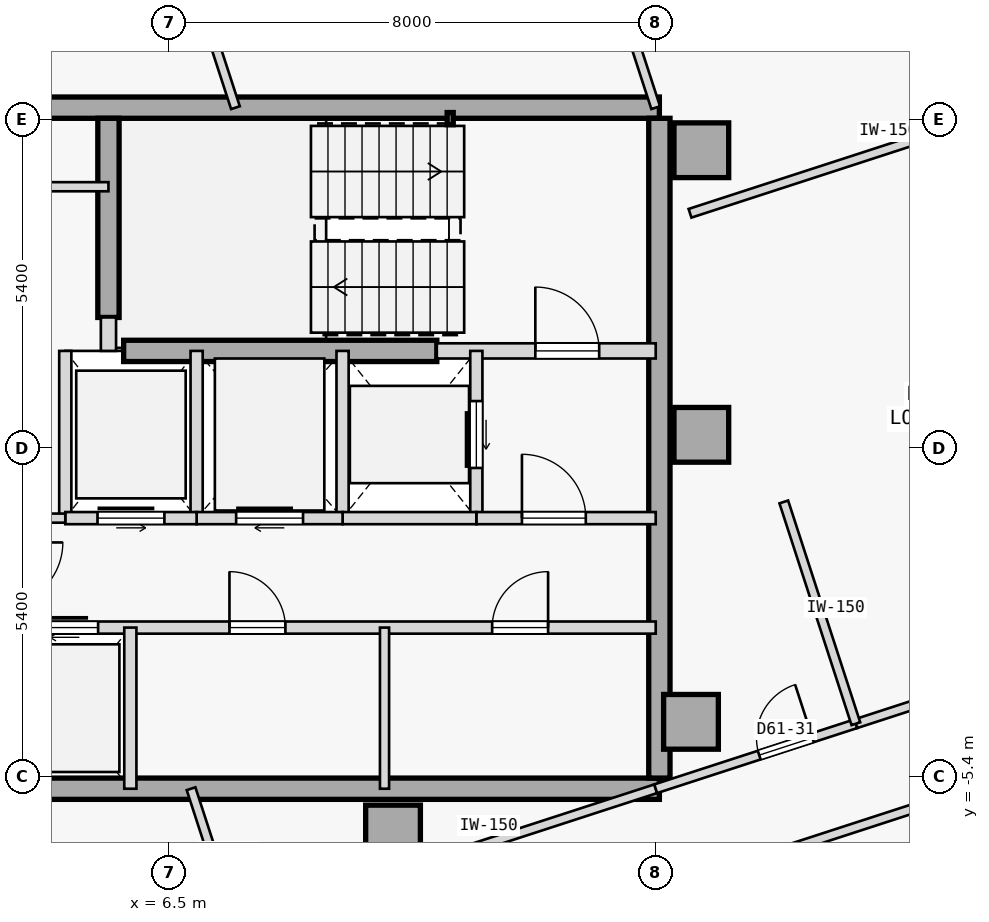
"""IFC4 building model, lengths in metres.
Left out: names, types, materials, properties, quantities, classifications, styles, units other than length and angle.
Written with IfcOpenShell. Run it as: python <this file> out.ifc"""

import sys

from ifc_helpers import new_model, si_unit, direction, frame, frame_2d, origin, origin_2d, place, context, subcontext, project, spatial, rectangle, hollow_rectangle, extrude, element, fill, save


model = new_model("IFC4")
c1 = context("Model", 3, precision=1e-05, world=origin(), true_north=direction((0.0, 1.0)))
c2 = subcontext(c1, "Body", "Model", "MODEL_VIEW")
j1 = project(units=[si_unit("LENGTHUNIT", "METRE"), si_unit("PLANEANGLEUNIT", "RADIAN")], contexts=[c1])
p1 = place(None, origin())
s1 = spatial("IfcSite", under=j1, at=p1, CompositionType="ELEMENT")
p2 = place(p1, origin())
s2 = spatial("IfcBuilding", under=s1, at=p2, CompositionType="ELEMENT")
p3 = place(p2, frame((0.0, 0.0, 231.0)))
s3 = spatial("IfcBuildingStorey", under=s2, at=p3, CompositionType="ELEMENT", Elevation=231.0)
for number, where, z_axis, x_axis in (
    (1, (15.25, 4.9, 0.0), (0.0, 0.0, 1.0), (1.0, 0.0, 0.0)),
    (2, (15.25, 0.22, 0.0), (0.0, 0.0, 1.0), (1.0, 0.0, 0.0)),
    (3, (15.08, -4.5, 0.0), (0.0, 0.0, 1.0), (1.0, 0.0, 0.0)),
    (4, (10.18, -6.32, 0.0), (0.0, 0.0, 1.0), (1.0, 0.0, 0.0)),
):
    element("IfcColumn", number, at=place(p3, frame(where, z_axis=z_axis, x_axis=x_axis)), inside=s3, PredefinedType="COLUMN", context=c2, shape_type="SweptSolid", body=[
        extrude(rectangle(XDim=0.9, YDim=0.9, at=origin_2d()), origin(), (0.0, 0.0, 1.0), 3.35),
    ])
p4 = place(p3, frame((3.15, 5.6, 0.0), z_axis=(0.0, 0.0, 1.0), x_axis=(1.0, 0.0, 0.0)))
e5 = element("IfcWall", 5, at=p4, inside=s3, PredefinedType="SHEAR", context=c2, shape_type="SweptSolid", body=[
    extrude(rectangle(XDim=11.41, YDim=0.35, at=frame_2d((5.705, 0.0))), origin(), (0.0, 0.0, 1.0), 3.125),
])
p5 = place(p3, frame((3.7, -5.6, 0.0), z_axis=(0.0, 0.0, 1.0), x_axis=(1.0, 0.0, 0.0)))
e6 = element("IfcWall", 6, at=p5, inside=s3, PredefinedType="SHEAR", context=c2, shape_type="SweptSolid", body=[
    extrude(rectangle(XDim=10.86, YDim=0.35, at=frame_2d((5.43, 0.0))), origin(), (0.0, 0.0, 1.0), 3.125),
])
p6 = place(p3, frame((14.56, -5.425, 0.0), z_axis=(0.0, 0.0, 1.0), x_axis=(0.0, 1.0, 0.0)))
e7 = element("IfcWall", 7, at=p6, inside=s3, PredefinedType="SHEAR", context=c2, shape_type="SweptSolid", body=[
    extrude(rectangle(XDim=10.85, YDim=0.35, at=frame_2d((5.425, 0.0))), origin(), (0.0, 0.0, 1.0), 3.125),
])
p7 = place(p3, frame((5.5, 2.15, 0.0), z_axis=(0.0, 0.0, 1.0), x_axis=(0.0, 1.0, 0.0)))
e8 = element("IfcWall", 8, at=p7, inside=s3, PredefinedType="SHEAR", context=c2, shape_type="SweptSolid", body=[
    extrude(rectangle(XDim=3.275, YDim=0.35, at=frame_2d((1.638, 0.0))), origin(), (0.0, 0.0, 1.0), 3.125),
])
p8 = place(p3, frame((5.75, 1.6, 0.0), z_axis=(0.0, 0.0, 1.0), x_axis=(1.0, 0.0, 0.0)))
e9 = element("IfcWall", 9, at=p8, inside=s3, PredefinedType="SHEAR", context=c2, shape_type="SweptSolid", body=[
    extrude(rectangle(XDim=5.15, YDim=0.35, at=frame_2d((2.575, 0.0))), origin(), (0.0, 0.0, 1.0), 3.125),
])
p9 = place(p3, frame((11.12, 5.42, 0.0), z_axis=(0.0, 0.0, 1.0), x_axis=(1.0, 0.0, 0.0)))
e10 = element("IfcColumn", 10, at=p9, inside=s3, PredefinedType="COLUMN", context=c2, shape_type="SweptSolid", body=[
    extrude(hollow_rectangle(XDim=0.1, YDim=0.2, WallThickness=0.008, at=origin_2d()), origin(), (0.0, 0.0, 1.0), 3.35),
])
p10 = place(p3, frame((10.9, 1.6, 0.0), z_axis=(0.0, 0.0, 1.0), x_axis=(1.0, 0.0, 0.0)))
e11 = element("IfcWall", 11, at=p10, inside=s3, PredefinedType="STANDARD", context=c2, shape_type="SweptSolid", body=[
    extrude(rectangle(XDim=3.6, YDim=0.25, at=frame_2d((1.8, 0.0))), origin(), (0.0, 0.0, 1.0), 3.125),
])
p11 = place(p10, frame((1.62, 0.0, 0.0)))
e12 = element("IfcOpeningElement", 12, at=p11, cuts=e11, PredefinedType="OPENING", context=c2, shape_type="SweptSolid", body=[
    extrude(rectangle(XDim=1.05, YDim=2.15, at=frame_2d((0.525, 1.075))), frame((0.0, 0.135, 0.0), z_axis=(0.0, -1.0, 0.0), x_axis=(1.0, 0.0, 0.0)), (0.0, 0.0, 1.0), 0.27),
])
p12 = place(p3, frame((5.5, 1.6, 0.0), z_axis=(0.0, 0.0, 1.0), x_axis=(0.0, 1.0, 0.0)))
e13 = element("IfcWall", 13, at=p12, inside=s3, PredefinedType="STANDARD", context=c2, shape_type="SweptSolid", body=[
    extrude(rectangle(XDim=0.55, YDim=0.25, at=frame_2d((0.275, 0.0))), origin(), (0.0, 0.0, 1.0), 3.125),
])
p13 = place(p3, frame((11.55, -1.15, 0.0), z_axis=(0.0, 0.0, 1.0), x_axis=(0.0, 1.0, 0.0)))
e14 = element("IfcWall", 14, at=p13, inside=s3, PredefinedType="STANDARD", context=c2, shape_type="SweptSolid", body=[
    extrude(rectangle(XDim=2.75, YDim=0.2, at=frame_2d((1.375, 0.0))), origin(), (0.0, 0.0, 1.0), 3.125),
])
p14 = place(p13, frame((0.825, 0.0, 0.0)))
e15 = element("IfcOpeningElement", 15, at=p14, cuts=e14, PredefinedType="OPENING", context=c2, shape_type="SweptSolid", body=[
    extrude(rectangle(XDim=1.1, YDim=2.15, at=frame_2d((0.55, 1.075))), frame((0.0, 0.11, 0.0), z_axis=(0.0, -1.0, 0.0), x_axis=(1.0, 0.0, 0.0)), (0.0, 0.0, 1.0), 0.22),
])
p15 = place(p3, frame((9.35, -1.15, 0.0), z_axis=(0.0, 0.0, 1.0), x_axis=(0.0, 1.0, 0.0)))
e16 = element("IfcWall", 16, at=p15, inside=s3, PredefinedType="STANDARD", context=c2, shape_type="SweptSolid", body=[
    extrude(rectangle(XDim=2.75, YDim=0.2, at=frame_2d((1.375, 0.0))), origin(), (0.0, 0.0, 1.0), 3.125),
])
p16 = place(p3, frame((11.55, -1.15, 0.0), z_axis=(0.0, 0.0, 1.0), x_axis=(1.0, 0.0, 0.0)))
e17 = element("IfcWall", 17, at=p16, inside=s3, PredefinedType="STANDARD", context=c2, shape_type="SweptSolid", body=[
    extrude(rectangle(XDim=2.95, YDim=0.2, at=frame_2d((1.475, 0.0))), origin(), (0.0, 0.0, 1.0), 3.125),
])
p17 = place(p16, frame((0.75, 0.0, 0.0)))
e18 = element("IfcOpeningElement", 18, at=p17, cuts=e17, PredefinedType="OPENING", context=c2, shape_type="SweptSolid", body=[
    extrude(rectangle(XDim=1.05, YDim=2.18, at=frame_2d((0.525, 1.09))), frame((0.0, 0.11, 0.0), z_axis=(0.0, -1.0, 0.0), x_axis=(1.0, 0.0, 0.0)), (0.0, 0.0, 1.0), 0.22),
])
p18 = place(p3, frame((9.35, -1.15, 0.0), z_axis=(0.0, 0.0, 1.0), x_axis=(1.0, 0.0, 0.0)))
e19 = element("IfcWall", 19, at=p18, inside=s3, PredefinedType="STANDARD", context=c2, shape_type="SweptSolid", body=[
    extrude(rectangle(XDim=2.2, YDim=0.2, at=frame_2d((1.1, 0.0))), origin(), (0.0, 0.0, 1.0), 3.125),
])
p19 = place(p3, frame((6.95, -1.15, 0.0), z_axis=(0.0, 0.0, 1.0), x_axis=(0.0, 1.0, 0.0)))
e20 = element("IfcWall", 20, at=p19, inside=s3, PredefinedType="STANDARD", context=c2, shape_type="SweptSolid", body=[
    extrude(rectangle(XDim=2.75, YDim=0.2, at=frame_2d((1.375, 0.0))), origin(), (0.0, 0.0, 1.0), 3.125),
])
p20 = place(p3, frame((6.95, -1.15, 0.0), z_axis=(0.0, 0.0, 1.0), x_axis=(1.0, 0.0, 0.0)))
e21 = element("IfcWall", 21, at=p20, inside=s3, PredefinedType="STANDARD", context=c2, shape_type="SweptSolid", body=[
    extrude(rectangle(XDim=2.4, YDim=0.2, at=frame_2d((1.2, 0.0))), origin(), (0.0, 0.0, 1.0), 3.125),
])
p21 = place(p20, frame((0.65, 0.0, 0.0)))
e22 = element("IfcOpeningElement", 22, at=p21, cuts=e21, PredefinedType="OPENING", context=c2, shape_type="SweptSolid", body=[
    extrude(rectangle(XDim=1.1, YDim=2.15, at=frame_2d((0.55, 1.075))), frame((0.0, 0.11, 0.0), z_axis=(0.0, -1.0, 0.0), x_axis=(1.0, 0.0, 0.0)), (0.0, 0.0, 1.0), 0.22),
])
p22 = place(p3, frame((4.79, -1.15, 0.0), z_axis=(0.0, 0.0, 1.0), x_axis=(0.0, 1.0, 0.0)))
e23 = element("IfcWall", 23, at=p22, inside=s3, PredefinedType="STANDARD", context=c2, shape_type="SweptSolid", body=[
    extrude(rectangle(XDim=2.75, YDim=0.2, at=frame_2d((1.375, 0.0))), origin(), (0.0, 0.0, 1.0), 3.125),
])
p23 = place(p3, frame((4.79, -1.15, 0.0), z_axis=(0.0, 0.0, 1.0), x_axis=(1.0, 0.0, 0.0)))
e24 = element("IfcWall", 24, at=p23, inside=s3, PredefinedType="STANDARD", context=c2, shape_type="SweptSolid", body=[
    extrude(rectangle(XDim=2.16, YDim=0.2, at=frame_2d((1.08, 0.0))), origin(), (0.0, 0.0, 1.0), 3.125),
])
p24 = place(p23, frame((0.53, 0.0, 0.0)))
e25 = element("IfcOpeningElement", 25, at=p24, cuts=e24, PredefinedType="OPENING", context=c2, shape_type="SweptSolid", body=[
    extrude(rectangle(XDim=1.1, YDim=2.15, at=frame_2d((0.55, 1.075))), frame((0.0, 0.11, 0.0), z_axis=(0.0, -1.0, 0.0), x_axis=(1.0, 0.0, 0.0)), (0.0, 0.0, 1.0), 0.22),
])
p25 = place(p3, frame((3.7, -1.15, 0.0), z_axis=(0.0, 0.0, 1.0), x_axis=(1.0, 0.0, 0.0)))
e26 = element("IfcWall", 26, at=p25, inside=s3, PredefinedType="PARTITIONING", context=c2, shape_type="SweptSolid", body=[
    extrude(rectangle(XDim=1.09, YDim=0.15, at=frame_2d((0.545, 0.0))), origin(), (0.0, 0.0, 1.0), 3.125),
])
p26 = place(p3, frame((3.7, -2.95, 0.0), z_axis=(0.0, 0.0, 1.0), x_axis=(1.0, 0.0, 0.0)))
e27 = element("IfcWall", 27, at=p26, inside=s3, PredefinedType="STANDARD", context=c2, shape_type="SweptSolid", body=[
    extrude(rectangle(XDim=10.8, YDim=0.2, at=frame_2d((5.4, 0.0))), origin(), (0.0, 0.0, 1.0), 3.125),
])
p27 = place(p26, frame((0.53, 0.0, 0.0)))
e28 = element("IfcOpeningElement", 28, at=p27, cuts=e27, PredefinedType="OPENING", context=c2, shape_type="SweptSolid", body=[
    extrude(rectangle(XDim=1.1, YDim=2.15, at=frame_2d((0.55, 1.075))), frame((0.0, 0.11, 0.0), z_axis=(0.0, -1.0, 0.0), x_axis=(1.0, 0.0, 0.0)), (0.0, 0.0, 1.0), 0.22),
])
p28 = place(p26, frame((3.79, 0.0, 0.0)))
e29 = element("IfcOpeningElement", 29, at=p28, cuts=e27, PredefinedType="OPENING", context=c2, shape_type="SweptSolid", body=[
    extrude(rectangle(XDim=0.92, YDim=2.15, at=frame_2d((0.46, 1.075))), frame((0.0, 0.11, 0.0), z_axis=(0.0, -1.0, 0.0), x_axis=(1.0, 0.0, 0.0)), (0.0, 0.0, 1.0), 0.22),
])
p29 = place(p26, frame((8.11, 0.0, 0.0)))
e30 = element("IfcOpeningElement", 30, at=p29, cuts=e27, PredefinedType="OPENING", context=c2, shape_type="SweptSolid", body=[
    extrude(rectangle(XDim=0.92, YDim=2.15, at=frame_2d((0.46, 1.075))), frame((0.0, 0.11, 0.0), z_axis=(0.0, -1.0, 0.0), x_axis=(1.0, 0.0, 0.0)), (0.0, 0.0, 1.0), 0.22),
])
p30 = place(p3, frame((5.86, -5.6, 0.0), z_axis=(0.0, 0.0, 1.0), x_axis=(0.0, 1.0, 0.0)))
e31 = element("IfcWall", 31, at=p30, inside=s3, PredefinedType="STANDARD", context=c2, shape_type="SweptSolid", body=[
    extrude(rectangle(XDim=2.65, YDim=0.2, at=frame_2d((1.325, 0.0))), origin(), (0.0, 0.0, 1.0), 3.125),
])
p31 = place(p3, frame((10.04, -5.6, 0.0), z_axis=(0.0, 0.0, 1.0), x_axis=(0.0, 1.0, 0.0)))
e32 = element("IfcWall", 32, at=p31, inside=s3, PredefinedType="PARTITIONING", context=c2, shape_type="SweptSolid", body=[
    extrude(rectangle(XDim=2.65, YDim=0.15, at=frame_2d((1.325, 0.0))), origin(), (0.0, 0.0, 1.0), 3.125),
])
p32 = place(p3, frame((3.7, 4.3, 0.0), z_axis=(0.0, 0.0, 1.0), x_axis=(1.0, 0.0, 0.0)))
e33 = element("IfcWall", 33, at=p32, inside=s3, PredefinedType="PARTITIONING", context=c2, shape_type="SweptSolid", body=[
    extrude(rectangle(XDim=1.8, YDim=0.15, at=frame_2d((0.9, 0.0))), origin(), (0.0, 0.0, 1.0), 3.125),
])
p33 = place(p3, frame((11.669, -8.223, 0.0), z_axis=(0.0, 0.0, 1.0), x_axis=(0.951057967787, 0.309012527106, 0.0)))
e34 = element("IfcWall", 34, at=p33, inside=s3, PredefinedType="PARTITIONING", context=c2, shape_type="SweptSolid", body=[
    extrude(rectangle(XDim=19.291, YDim=0.15, at=frame_2d((9.646, 0.0))), origin(), (0.0, 0.0, 1.0), 3.125),
])
p34 = place(p33, frame((9.17, 0.0, 0.0)))
e35 = element("IfcOpeningElement", 35, at=p34, cuts=e34, PredefinedType="OPENING", context=c2, shape_type="SweptSolid", body=[
    extrude(rectangle(XDim=0.95, YDim=2.15, at=frame_2d((0.475, 1.075))), frame((0.0, 0.085, 0.0), z_axis=(0.0, -1.0, 0.0), x_axis=(1.0, 0.0, 0.0)), (0.0, 0.0, 1.0), 0.17),
])
p35 = place(p3, frame((7.588, -7.846, 0.0), z_axis=(0.0, 0.0, 1.0), x_axis=(0.951058013903, 0.309012385174, 0.0)))
e36 = element("IfcWall", 36, at=p35, inside=s3, PredefinedType="PARTITIONING", context=c2, shape_type="SweptSolid", body=[
    extrude(rectangle(XDim=7.267, YDim=0.15, at=frame_2d((3.634, 0.0))), origin(), (0.0, 0.0, 1.0), 3.125),
])
p36 = place(p35, frame((0.557, 0.0, 0.0)))
e37 = element("IfcOpeningElement", 37, at=p36, cuts=e36, PredefinedType="OPENING", context=c2, shape_type="SweptSolid", body=[
    extrude(rectangle(XDim=0.92, YDim=2.15, at=frame_2d((0.46, 1.075))), frame((0.0, 0.085, 0.0), z_axis=(0.0, -1.0, 0.0), x_axis=(1.0, 0.0, 0.0)), (0.0, 0.0, 1.0), 0.17),
])
p37 = place(p3, frame((14.5, -5.6, 0.0), z_axis=(0.0, 0.0, 1.0), x_axis=(0.951047546178, 0.309044600193, 0.0)))
e38 = element("IfcWall", 38, at=p37, inside=s3, PredefinedType="PARTITIONING", context=c2, shape_type="SweptSolid", body=[
    extrude(rectangle(XDim=3.461, YDim=0.15, at=frame_2d((1.73, 0.0))), origin(), (0.0, 0.0, 1.0), 3.125),
])
p38 = place(p37, frame((1.79, 0.0, 0.0)))
e39 = element("IfcOpeningElement", 39, at=p38, cuts=e38, PredefinedType="OPENING", context=c2, shape_type="SweptSolid", body=[
    extrude(rectangle(XDim=0.92, YDim=2.15, at=frame_2d((0.46, 1.075))), frame((0.0, 0.085, 0.0), z_axis=(0.0, -1.0, 0.0), x_axis=(1.0, 0.0, 0.0)), (0.0, 0.0, 1.0), 0.17),
])
p39 = place(p3, frame((17.791, -4.531, 0.0), z_axis=(0.0, 0.0, 1.0), x_axis=(0.951056769902, 0.309016213852, 0.0)))
e40 = element("IfcWall", 40, at=p39, inside=s3, PredefinedType="PARTITIONING", context=c2, shape_type="SweptSolid", body=[
    extrude(rectangle(XDim=10.352, YDim=0.15, at=frame_2d((5.176, 0.0))), origin(), (0.0, 0.0, 1.0), 3.125),
])
p40 = place(p39, frame((4.716, 0.0, 0.0)))
e41 = element("IfcOpeningElement", 41, at=p40, cuts=e40, PredefinedType="OPENING", context=c2, shape_type="SweptSolid", body=[
    extrude(rectangle(XDim=0.92, YDim=2.15, at=frame_2d((0.46, 1.075))), frame((0.0, 0.085, 0.0), z_axis=(0.0, -1.0, 0.0), x_axis=(1.0, 0.0, 0.0)), (0.0, 0.0, 1.0), 0.17),
])
p41 = place(p3, frame((7.588, -7.846, 0.0), z_axis=(0.0, 0.0, 1.0), x_axis=(-0.309055688452, 0.951043942957, 0.0)))
e42 = element("IfcWall", 42, at=p41, inside=s3, PredefinedType="PARTITIONING", context=c2, shape_type="SweptSolid", body=[
    extrude(rectangle(XDim=2.362, YDim=0.15, at=frame_2d((1.181, 0.0))), origin(), (0.0, 0.0, 1.0), 3.125),
])
p42 = place(p3, frame((17.791, -4.531, 0.0), z_axis=(0.0, 0.0, 1.0), x_axis=(-0.309018414265, 0.951056054944, 0.0)))
e43 = element("IfcWall", 43, at=p42, inside=s3, PredefinedType="PARTITIONING", context=c2, shape_type="SweptSolid", body=[
    extrude(rectangle(XDim=3.835, YDim=0.15, at=frame_2d((1.917, 0.0))), origin(), (0.0, 0.0, 1.0), 3.125),
])
p43 = place(p3, frame((7.588, 5.6, 0.0), z_axis=(0.0, 0.0, 1.0), x_axis=(-0.309018946982, 0.951055881852, 0.0)))
e44 = element("IfcWall", 44, at=p43, inside=s3, PredefinedType="PARTITIONING", context=c2, shape_type="SweptSolid", body=[
    extrude(rectangle(XDim=6.826, YDim=0.15, at=frame_2d((3.413, 0.0))), origin(), (0.0, 0.0, 1.0), 3.125),
])
p44 = place(p3, frame((14.5, 5.6, 0.0), z_axis=(0.0, 0.0, 1.0), x_axis=(-0.308974360462, 0.951070367837, 0.0)))
e45 = element("IfcWall", 45, at=p44, inside=s3, PredefinedType="PARTITIONING", context=c2, shape_type="SweptSolid", body=[
    extrude(rectangle(XDim=4.843, YDim=0.15, at=frame_2d((2.421, 0.0))), origin(), (0.0, 0.0, 1.0), 3.125),
])
p45 = place(p3, frame((15.064, 3.863, 0.0), z_axis=(0.0, 0.0, 1.0), x_axis=(0.951061448945, 0.309001812827, 0.0)))
e46 = element("IfcWall", 46, at=p45, inside=s3, PredefinedType="PARTITIONING", context=c2, shape_type="SweptSolid", body=[
    extrude(rectangle(XDim=10.352, YDim=0.15, at=frame_2d((5.176, 0.0))), origin(), (0.0, 0.0, 1.0), 3.125),
])
p46 = place(p45, frame((4.716, 0.0, 0.0)))
e47 = element("IfcOpeningElement", 47, at=p46, cuts=e46, PredefinedType="OPENING", context=c2, shape_type="SweptSolid", body=[
    extrude(rectangle(XDim=0.92, YDim=2.15, at=frame_2d((0.46, 1.075))), frame((0.0, 0.085, 0.0), z_axis=(0.0, -1.0, 0.0), x_axis=(1.0, 0.0, 0.0)), (0.0, 0.0, 1.0), 0.17),
])
p47 = place(p11, origin())
e48 = element("IfcDoor", 48, at=p47, inside=s3, OperationType="SINGLE_SWING_LEFT", PredefinedType="DOOR", context=c2, shape_type="SweptSolid", body=[
    extrude(rectangle(XDim=1.05, YDim=2.15, at=frame_2d((0.525, 1.075))), frame((0.0, 0.025, 0.0), z_axis=(0.0, -1.0, 0.0), x_axis=(1.0, 0.0, 0.0)), (0.0, 0.0, 1.0), 0.05),
])
fill(e12, e48)
p48 = place(p17, origin())
e49 = element("IfcDoor", 49, at=p48, inside=s3, OperationType="SINGLE_SWING_LEFT", PredefinedType="DOOR", context=c2, shape_type="SweptSolid", body=[
    extrude(rectangle(XDim=1.05, YDim=2.18, at=frame_2d((0.525, 1.09))), frame((0.0, 0.025, 0.0), z_axis=(0.0, -1.0, 0.0), x_axis=(1.0, 0.0, 0.0)), (0.0, 0.0, 1.0), 0.05),
])
fill(e18, e49)
p49 = place(p14, origin())
e50 = element("IfcDoor", 50, at=p49, inside=s3, OperationType="SLIDING_TO_RIGHT", PredefinedType="DOOR", context=c2, shape_type="SweptSolid", body=[
    extrude(rectangle(XDim=1.1, YDim=2.15, at=frame_2d((0.55, 1.075))), frame((0.0, 0.025, 0.0), z_axis=(0.0, -1.0, 0.0), x_axis=(1.0, 0.0, 0.0)), (0.0, 0.0, 1.0), 0.05),
])
fill(e15, e50)
p50 = place(p21, origin())
e51 = element("IfcDoor", 51, at=p50, inside=s3, OperationType="SLIDING_TO_RIGHT", PredefinedType="DOOR", context=c2, shape_type="SweptSolid", body=[
    extrude(rectangle(XDim=1.1, YDim=2.15, at=frame_2d((0.55, 1.075))), frame((0.0, 0.025, 0.0), z_axis=(0.0, -1.0, 0.0), x_axis=(1.0, 0.0, 0.0)), (0.0, 0.0, 1.0), 0.05),
])
fill(e22, e51)
p51 = place(p24, origin())
e52 = element("IfcDoor", 52, at=p51, inside=s3, OperationType="SLIDING_TO_LEFT", PredefinedType="DOOR", context=c2, shape_type="SweptSolid", body=[
    extrude(rectangle(XDim=1.1, YDim=2.15, at=frame_2d((0.55, 1.075))), frame((0.0, 0.025, 0.0), z_axis=(0.0, -1.0, 0.0), x_axis=(1.0, 0.0, 0.0)), (0.0, 0.0, 1.0), 0.05),
])
fill(e25, e52)
p52 = place(p27, origin())
e53 = element("IfcDoor", 53, at=p52, inside=s3, OperationType="SLIDING_TO_RIGHT", PredefinedType="DOOR", context=c2, shape_type="SweptSolid", body=[
    extrude(rectangle(XDim=1.1, YDim=2.15, at=frame_2d((0.55, 1.075))), frame((0.0, 0.025, 0.0), z_axis=(0.0, -1.0, 0.0), x_axis=(1.0, 0.0, 0.0)), (0.0, 0.0, 1.0), 0.05),
])
fill(e28, e53)
p53 = place(p28, origin())
e54 = element("IfcDoor", 54, at=p53, inside=s3, OperationType="SINGLE_SWING_LEFT", PredefinedType="DOOR", context=c2, shape_type="SweptSolid", body=[
    extrude(rectangle(XDim=0.92, YDim=2.15, at=frame_2d((0.46, 1.075))), frame((0.0, 0.025, 0.0), z_axis=(0.0, -1.0, 0.0), x_axis=(1.0, 0.0, 0.0)), (0.0, 0.0, 1.0), 0.05),
])
fill(e29, e54)
p54 = place(p29, origin())
e55 = element("IfcDoor", 55, at=p54, inside=s3, OperationType="SINGLE_SWING_RIGHT", PredefinedType="DOOR", context=c2, shape_type="SweptSolid", body=[
    extrude(rectangle(XDim=0.92, YDim=2.15, at=frame_2d((0.46, 1.075))), frame((0.0, 0.025, 0.0), z_axis=(0.0, -1.0, 0.0), x_axis=(1.0, 0.0, 0.0)), (0.0, 0.0, 1.0), 0.05),
])
fill(e30, e55)
p55 = place(p38, origin())
e56 = element("IfcDoor", 56, at=p55, inside=s3, OperationType="SINGLE_SWING_RIGHT", PredefinedType="DOOR", context=c2, shape_type="SweptSolid", body=[
    extrude(rectangle(XDim=0.92, YDim=2.15, at=frame_2d((0.46, 1.075))), frame((0.0, 0.025, 0.0), z_axis=(0.0, -1.0, 0.0), x_axis=(1.0, 0.0, 0.0)), (0.0, 0.0, 1.0), 0.05),
])
fill(e39, e56)
save(model, sys.argv[1])
